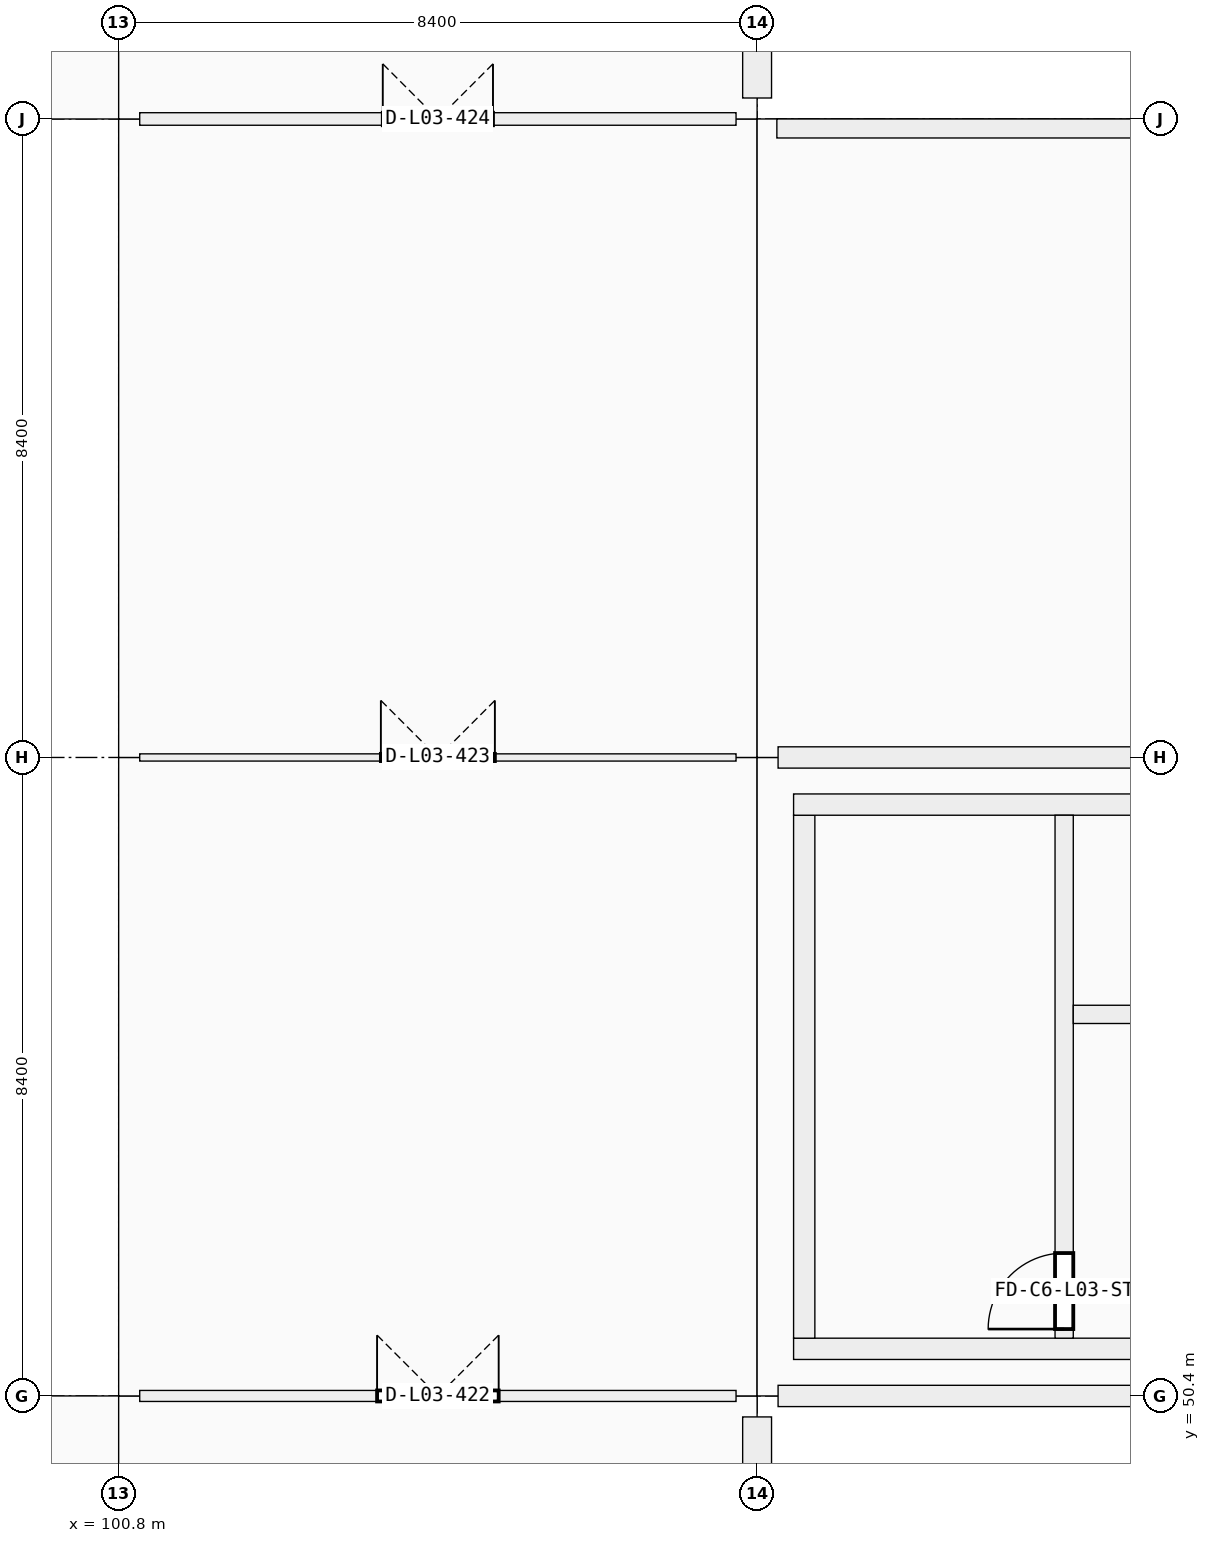
"""IFC4 building model, lengths in metres.
Left out: names, types, materials, properties, quantities, classifications, styles, units other than length and angle.
Written with IfcOpenShell. Run it as: python <this file> out.ifc"""

import sys

from ifc_helpers import new_model, si_unit, direction, frame, frame_2d, origin, origin_2d, place, context, subcontext, project, spatial, rectangle, i_section, extrude, element, fill, save


model = new_model("IFC4")
c1 = context("Model", 3, precision=1e-05, world=origin(), true_north=direction((0.0, 1.0)))
c2 = subcontext(c1, "Body", "Model", "MODEL_VIEW")
j1 = project(units=[si_unit("LENGTHUNIT", "METRE"), si_unit("PLANEANGLEUNIT", "RADIAN")], contexts=[c1])
p1 = place(None, origin())
s1 = spatial("IfcSite", under=j1, at=p1, CompositionType="ELEMENT")
p2 = place(p1, origin())
s2 = spatial("IfcBuilding", under=s1, at=p2, CompositionType="ELEMENT")
p3 = place(p2, frame((0.0, 0.0, 14.76)))
s3 = spatial("IfcBuildingStorey", under=s2, at=p3, CompositionType="ELEMENT", Elevation=14.76)
for number, where, z_axis, x_axis in (
    (1, (100.8, 50.4, 0.0), (0.0, 0.0, 1.0), (1.0, 0.0, 0.0)),
    (2, (100.8, 58.8, 0.0), (0.0, 0.0, 1.0), (1.0, 0.0, 0.0)),
    (3, (100.8, 67.2, 0.0), (0.0, 0.0, 1.0), (1.0, 0.0, 0.0)),
    (4, (109.2, 50.4, 0.0), (0.0, 0.0, 1.0), (1.0, 0.0, 0.0)),
    (5, (109.2, 58.8, 0.0), (0.0, 0.0, 1.0), (1.0, 0.0, 0.0)),
    (6, (109.2, 67.2, 0.0), (0.0, 0.0, 1.0), (1.0, 0.0, 0.0)),
):
    element("IfcColumn", number, at=place(p3, frame(where, z_axis=z_axis, x_axis=x_axis)), inside=s3, PredefinedType="COLUMN", context=c2, shape_type="SweptSolid", body=[
        extrude(rectangle(XDim=0.55, YDim=0.55, at=origin_2d()), origin(), (0.0, 0.0, 1.0), 4.14),
    ])
p4 = place(p3, frame((109.2, 50.4, 4.14), z_axis=(0.0, 0.0, 1.0), x_axis=(1.0, 0.0, 0.0)))
e7 = element("IfcColumn", 7, at=p4, inside=s3, PredefinedType="COLUMN", context=c2, shape_type="SweptSolid", body=[
    extrude(i_section(OverallWidth=0.305, OverallDepth=0.308, WebThickness=0.01, FlangeThickness=0.015, FilletRadius=0.017, at=origin_2d()), origin(), (0.0, 0.0, 1.0), 1.709),
])
p5 = place(p3, frame((109.2, 58.8, 4.14), z_axis=(0.0, 0.0, 1.0), x_axis=(1.0, 0.0, 0.0)))
e8 = element("IfcColumn", 8, at=p5, inside=s3, PredefinedType="COLUMN", context=c2, shape_type="SweptSolid", body=[
    extrude(i_section(OverallWidth=0.305, OverallDepth=0.308, WebThickness=0.01, FlangeThickness=0.015, FilletRadius=0.017, at=origin_2d()), origin(), (0.0, 0.0, 1.0), 2.558),
])
p6 = place(p3, frame((109.2, 67.2, 4.14), z_axis=(0.0, 0.0, 1.0), x_axis=(1.0, 0.0, 0.0)))
e9 = element("IfcColumn", 9, at=p6, inside=s3, PredefinedType="COLUMN", context=c2, shape_type="SweptSolid", body=[
    extrude(i_section(OverallWidth=0.305, OverallDepth=0.308, WebThickness=0.01, FlangeThickness=0.015, FilletRadius=0.017, at=origin_2d()), origin(), (0.0, 0.0, 1.0), 1.709),
])
p7 = place(p3, frame((109.2, 50.124, 0.0), z_axis=(0.0, 0.0, 1.0), x_axis=(0.0, -1.0, 0.0)))
e10 = element("IfcWall", 10, at=p7, inside=s3, PredefinedType="SOLIDWALL", context=c2, shape_type="SweptSolid", body=[
    extrude(rectangle(XDim=7.848, YDim=0.38, at=frame_2d((3.924, 0.0))), origin(), (0.0, 0.0, 1.0), 2.52),
])
p8 = place(p3, frame((109.2, 75.324, 0.0), z_axis=(0.0, 0.0, 1.0), x_axis=(0.0, -1.0, 0.0)))
e11 = element("IfcWall", 11, at=p8, inside=s3, PredefinedType="SOLIDWALL", context=c2, shape_type="SweptSolid", body=[
    extrude(rectangle(XDim=7.848, YDim=0.38, at=frame_2d((3.924, 0.0))), origin(), (0.0, 0.0, 1.0), 2.52),
])
for number, where, z_axis, x_axis in (
    (12, (117.324, 50.4, 0.0), (0.0, 0.0, 1.0), (-1.0, 0.0, 0.0)),
    (13, (109.476, 58.8, 0.0), (0.0, 0.0, 1.0), (1.0, 0.0, 0.0)),
):
    element("IfcWall", number, at=place(p3, frame(where, z_axis=z_axis, x_axis=x_axis)), inside=s3, PredefinedType="SOLIDWALL", context=c2, shape_type="SweptSolid", body=[
        extrude(rectangle(XDim=7.848, YDim=0.28, at=frame_2d((3.924, 0.0))), origin(), (0.0, 0.0, 1.0), 3.37),
    ])
p9 = place(p3, frame((109.46, 67.075, 0.0), z_axis=(0.0, 0.0, 1.0), x_axis=(1.0, 0.0, 0.0)))
e14 = element("IfcWall", 14, at=p9, inside=s3, PredefinedType="PARAPET", context=c2, shape_type="SweptSolid", body=[
    extrude(rectangle(XDim=7.88, YDim=0.25, at=frame_2d((3.94, 0.0))), origin(), (0.0, 0.0, 1.0), 0.95),
])
p10 = place(p3, frame((117.12, 51.02, 0.0), z_axis=(0.0, 0.0, 1.0), x_axis=(-1.0, 0.0, 0.0)))
e15 = element("IfcWall", 15, at=p10, inside=s3, PredefinedType="SHEAR", context=c2, shape_type="SweptSolid", body=[
    extrude(rectangle(XDim=7.44, YDim=0.28, at=frame_2d((3.72, 0.0))), origin(), (0.0, 0.0, 1.0), 4.07),
])
p11 = place(p3, frame((109.82, 51.16, 0.0), z_axis=(0.0, 0.0, 1.0), x_axis=(0.0, 1.0, 0.0)))
e16 = element("IfcWall", 16, at=p11, inside=s3, PredefinedType="SHEAR", context=c2, shape_type="SweptSolid", body=[
    extrude(rectangle(XDim=6.88, YDim=0.28, at=frame_2d((3.44, 0.0))), origin(), (0.0, 0.0, 1.0), 4.07),
])
p12 = place(p3, frame((109.68, 58.18, 0.0), z_axis=(0.0, 0.0, 1.0), x_axis=(1.0, 0.0, 0.0)))
e17 = element("IfcWall", 17, at=p12, inside=s3, PredefinedType="SHEAR", context=c2, shape_type="SweptSolid", body=[
    extrude(rectangle(XDim=7.44, YDim=0.28, at=frame_2d((3.72, 0.0))), origin(), (0.0, 0.0, 1.0), 4.07),
])
p13 = place(p3, frame((113.24, 51.16, 0.0), z_axis=(0.0, 0.0, 1.0), x_axis=(0.0, 1.0, 0.0)))
e18 = element("IfcWall", 18, at=p13, inside=s3, PredefinedType="SHEAR", context=c2, shape_type="SweptSolid", body=[
    extrude(rectangle(XDim=6.88, YDim=0.24, at=frame_2d((3.44, 0.0))), origin(), (0.0, 0.0, 1.0), 4.07),
])
p14 = place(p13, frame((0.12, 0.0, 0.0)))
e19 = element("IfcOpeningElement", 19, at=p14, cuts=e18, PredefinedType="OPENING", context=c2, shape_type="SweptSolid", body=[
    extrude(rectangle(XDim=1.0, YDim=2.15, at=frame_2d((0.5, 1.075))), frame((0.0, 0.12, 0.0), z_axis=(0.0, -1.0, 0.0), x_axis=(1.0, 0.0, 0.0)), (0.0, 0.0, 1.0), 0.24),
])
p15 = place(p3, frame((113.36, 55.42, 0.0), z_axis=(0.0, 0.0, 1.0), x_axis=(1.0, 0.0, 0.0)))
e20 = element("IfcWall", 20, at=p15, inside=s3, PredefinedType="SHEAR", context=c2, shape_type="SweptSolid", body=[
    extrude(rectangle(XDim=3.48, YDim=0.24, at=frame_2d((1.74, 0.0))), origin(), (0.0, 0.0, 1.0), 4.07),
])
p16 = place(p15, frame((1.19, 0.0, 0.0)))
e21 = element("IfcOpeningElement", 21, at=p16, cuts=e20, PredefinedType="OPENING", context=c2, shape_type="SweptSolid", body=[
    extrude(rectangle(XDim=1.1, YDim=2.15, at=frame_2d((0.55, 1.075))), frame((0.0, 0.12, 0.0), z_axis=(0.0, -1.0, 0.0), x_axis=(1.0, 0.0, 0.0)), (0.0, 0.0, 1.0), 0.24),
])
p17 = place(p3, frame((101.077, 50.4, 0.0), z_axis=(0.0, 0.0, 1.0), x_axis=(1.0, 0.0, 0.0)))
e22 = element("IfcWall", 22, at=p17, inside=s3, PredefinedType="PARTITIONING", context=c2, shape_type="SweptSolid", body=[
    extrude(rectangle(XDim=7.846, YDim=0.145, at=frame_2d((3.923, 0.0))), origin(), (0.0, 0.0, 1.0), 3.19),
])
p18 = place(p17, frame((3.123, 0.0, 0.0)))
e23 = element("IfcOpeningElement", 23, at=p18, cuts=e22, PredefinedType="OPENING", context=c2, shape_type="SweptSolid", body=[
    extrude(rectangle(XDim=1.6, YDim=2.3, at=frame_2d((0.8, 1.15))), frame((0.0, 0.073, 0.0), z_axis=(0.0, -1.0, 0.0), x_axis=(1.0, 0.0, 0.0)), (0.0, 0.0, 1.0), 0.145),
])
p19 = place(p3, frame((101.077, 58.8, 0.0), z_axis=(0.0, 0.0, 1.0), x_axis=(1.0, 0.0, 0.0)))
e24 = element("IfcWall", 24, at=p19, inside=s3, PredefinedType="PARTITIONING", context=c2, shape_type="SweptSolid", body=[
    extrude(rectangle(XDim=7.846, YDim=0.095, at=frame_2d((3.923, 0.0))), origin(), (0.0, 0.0, 1.0), 3.19),
])
p20 = place(p19, frame((3.173, 0.0, 0.0)))
e25 = element("IfcOpeningElement", 25, at=p20, cuts=e24, PredefinedType="OPENING", context=c2, shape_type="SweptSolid", body=[
    extrude(rectangle(XDim=1.5, YDim=2.25, at=frame_2d((0.75, 1.125))), frame((0.0, 0.047, 0.0), z_axis=(0.0, -1.0, 0.0), x_axis=(1.0, 0.0, 0.0)), (0.0, 0.0, 1.0), 0.095),
])
p21 = place(p3, frame((101.077, 67.2, 0.0), z_axis=(0.0, 0.0, 1.0), x_axis=(1.0, 0.0, 0.0)))
e26 = element("IfcWall", 26, at=p21, inside=s3, PredefinedType="PARTITIONING", context=c2, shape_type="SweptSolid", body=[
    extrude(rectangle(XDim=7.846, YDim=0.165, at=frame_2d((3.923, 0.0))), origin(), (0.0, 0.0, 1.0), 3.19),
])
p22 = place(p21, frame((3.198, 0.0, 0.0)))
e27 = element("IfcOpeningElement", 27, at=p22, cuts=e26, PredefinedType="OPENING", context=c2, shape_type="SweptSolid", body=[
    extrude(rectangle(XDim=1.45, YDim=2.2, at=frame_2d((0.725, 1.1))), frame((0.0, 0.083, 0.0), z_axis=(0.0, -1.0, 0.0), x_axis=(1.0, 0.0, 0.0)), (0.0, 0.0, 1.0), 0.165),
])
p23 = place(p14, origin())
e28 = element("IfcDoor", 28, at=p23, inside=s3, OperationType="SINGLE_SWING_LEFT", PredefinedType="DOOR", context=c2, shape_type="SweptSolid", body=[
    extrude(rectangle(XDim=1.0, YDim=2.15, at=frame_2d((0.5, 1.075))), frame((0.0, 0.025, 0.0), z_axis=(0.0, -1.0, 0.0), x_axis=(1.0, 0.0, 0.0)), (0.0, 0.0, 1.0), 0.05),
])
fill(e19, e28)
p24 = place(p18, origin())
e29 = element("IfcDoor", 29, at=p24, inside=s3, OperationType="DOUBLE_DOOR_SINGLE_SWING", PredefinedType="DOOR", context=c2, shape_type="SweptSolid", body=[
    extrude(rectangle(XDim=1.6, YDim=2.3, at=frame_2d((0.8, 1.15))), frame((0.0, 0.025, 0.0), z_axis=(0.0, -1.0, 0.0), x_axis=(1.0, 0.0, 0.0)), (0.0, 0.0, 1.0), 0.05),
])
fill(e23, e29)
p25 = place(p20, origin())
e30 = element("IfcDoor", 30, at=p25, inside=s3, OperationType="DOUBLE_DOOR_SINGLE_SWING", PredefinedType="DOOR", context=c2, shape_type="SweptSolid", body=[
    extrude(rectangle(XDim=1.5, YDim=2.25, at=frame_2d((0.75, 1.125))), frame((0.0, 0.025, 0.0), z_axis=(0.0, -1.0, 0.0), x_axis=(1.0, 0.0, 0.0)), (0.0, 0.0, 1.0), 0.05),
])
fill(e25, e30)
p26 = place(p22, origin())
e31 = element("IfcDoor", 31, at=p26, inside=s3, OperationType="DOUBLE_DOOR_SINGLE_SWING", PredefinedType="DOOR", context=c2, shape_type="SweptSolid", body=[
    extrude(rectangle(XDim=1.45, YDim=2.2, at=frame_2d((0.725, 1.1))), frame((0.0, 0.025, 0.0), z_axis=(0.0, -1.0, 0.0), x_axis=(1.0, 0.0, 0.0)), (0.0, 0.0, 1.0), 0.05),
])
fill(e27, e31)
save(model, sys.argv[1])
